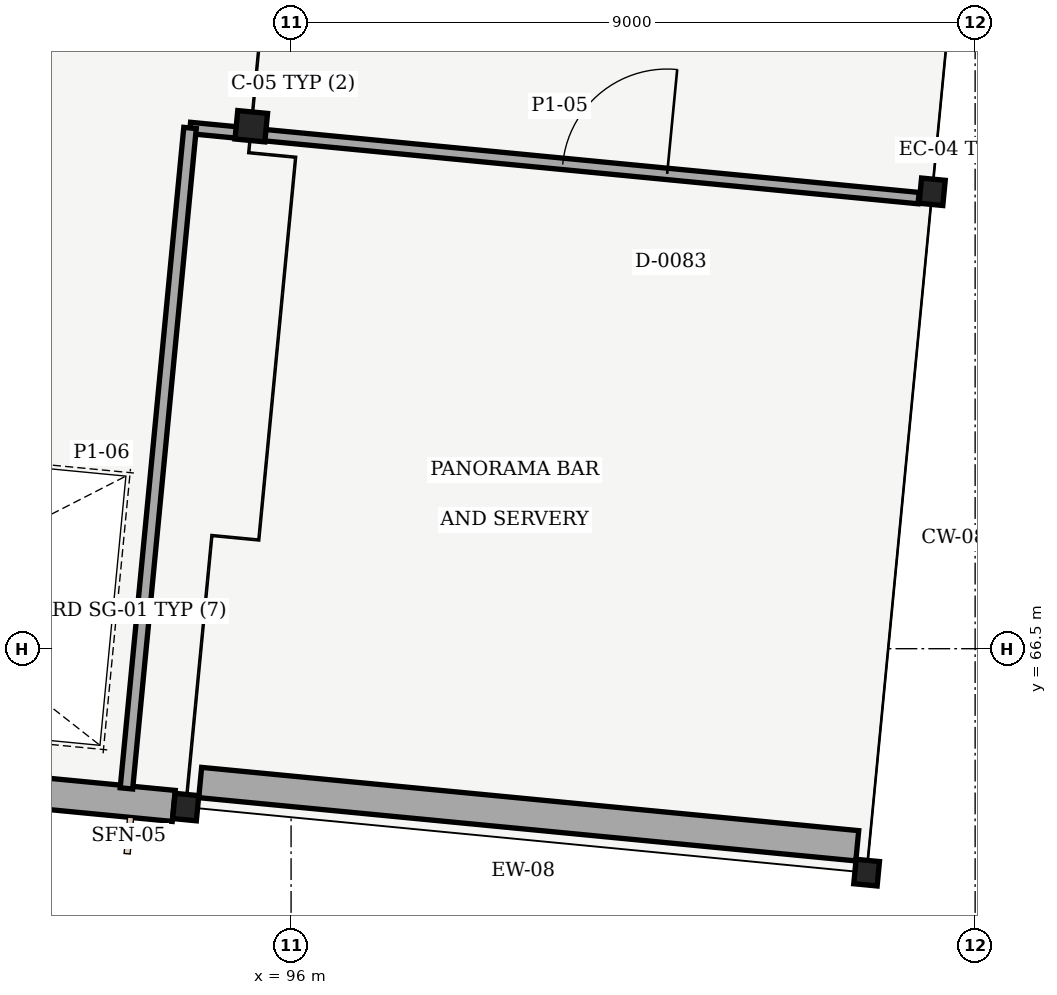
"""IFC4 building model, lengths in metres.
Left out: names, types, materials, properties, quantities, classifications, styles, units other than length and angle.
Written with IfcOpenShell. Run it as: python <this file> out.ifc"""

import sys

from ifc_helpers import new_model, si_unit, direction, frame, frame_2d, origin, origin_with_axes, origin_2d, place, context, subcontext, project, spatial, rectangle, i_section, extrude, element, fill, save


model = new_model("IFC4")
c1 = context("Model", 3, precision=1e-05, world=origin(), true_north=direction((0.0, 1.0)))
c2 = subcontext(c1, "Body", "Model", "MODEL_VIEW")
j1 = project(units=[si_unit("LENGTHUNIT", "METRE"), si_unit("PLANEANGLEUNIT", "RADIAN")], contexts=[c1])
p1 = place(None, origin())
s1 = spatial("IfcSite", under=j1, at=p1, CompositionType="ELEMENT")
p2 = place(p1, origin())
s2 = spatial("IfcBuilding", under=s1, at=p2, CompositionType="ELEMENT")
p3 = place(p2, frame((0.0, 0.0, 9.6)))
s3 = spatial("IfcBuildingStorey", under=s2, at=p3, CompositionType="ELEMENT", Elevation=9.6)
p4 = place(p3, frame((94.614, 64.416, 0.0), z_axis=(0.0, 0.0, 1.0), x_axis=(0.995396198367, -0.09584575252, 0.0)))
e1 = element("IfcColumn", 1, at=p4, inside=s3, PredefinedType="COLUMN", context=c2, shape_type="SweptSolid", body=[
    extrude(i_section(OverallWidth=0.313, OverallDepth=0.333, WebThickness=0.018, FlangeThickness=0.028, FilletRadius=0.013, at=origin_2d()), origin(), (0.0, 0.0, 1.0), 4.8),
])
p5 = place(p3, frame((95.476, 73.375, 0.0), z_axis=(0.0, 0.0, 1.0), x_axis=(0.995396198367, -0.09584575252, 0.0)))
e2 = element("IfcColumn", 2, at=p5, inside=s3, PredefinedType="COLUMN", context=c2, shape_type="SweptSolid", body=[
    extrude(i_section(OverallWidth=0.394, OverallDepth=0.376, WebThickness=0.017, FlangeThickness=0.028, FilletRadius=0.015, at=origin_2d()), origin(), (0.0, 0.0, 1.0), 4.8),
])
p6 = place(p3, frame((103.572, 63.553, 0.0), z_axis=(0.0, 0.0, 1.0), x_axis=(0.995396198367, -0.09584575252, 0.0)))
e3 = element("IfcColumn", 3, at=p6, inside=s3, PredefinedType="COLUMN", context=c2, shape_type="SweptSolid", body=[
    extrude(i_section(OverallWidth=0.309, OverallDepth=0.323, WebThickness=0.014, FlangeThickness=0.023, FilletRadius=0.013, at=origin_2d()), origin(), (0.0, 0.0, 1.0), 4.8),
])
p7 = place(p3, frame((104.435, 72.512, 0.0), z_axis=(0.0, 0.0, 1.0), x_axis=(0.995396198367, -0.09584575252, 0.0)))
e4 = element("IfcColumn", 4, at=p7, inside=s3, PredefinedType="COLUMN", context=c2, shape_type="SweptSolid", body=[
    extrude(i_section(OverallWidth=0.313, OverallDepth=0.333, WebThickness=0.018, FlangeThickness=0.028, FilletRadius=0.013, at=origin_2d()), origin(), (0.0, 0.0, 1.0), 4.8),
])
p8 = place(p3, frame((103.449, 63.907, 0.0), z_axis=(0.0, 0.0, 1.0), x_axis=(-0.995397794476, 0.095829174848, 0.0)))
e5 = element("IfcWall", 5, at=p8, inside=s3, PredefinedType="SOLIDWALL", context=c2, shape_type="SweptSolid", body=[
    extrude(rectangle(XDim=8.685, YDim=0.4, at=frame_2d((4.343, 0.0))), origin(), (0.0, 0.0, 1.0), 3.4),
])
p9 = place(p3, frame((94.456, 64.431, 0.0), z_axis=(0.0, 0.0, 1.0), x_axis=(-0.99539453955, 0.09586297843, 0.0)))
e6 = element("IfcWall", 6, at=p9, inside=s3, PredefinedType="SOLIDWALL", context=c2, shape_type="SweptSolid", body=[
    extrude(rectangle(XDim=8.712, YDim=0.41, at=frame_2d((4.356, 0.0))), origin(), (0.0, 0.0, 1.0), 3.4),
])
p10 = place(p3, frame((94.67, 73.352, 0.0), z_axis=(0.0, 0.0, 1.0), x_axis=(0.995395223339, -0.095855878039, 0.0)))
e7 = element("IfcWall", 7, at=p10, inside=s3, PredefinedType="PARTITIONING", context=c2, shape_type="SweptSolid", body=[
    extrude(rectangle(XDim=9.63, YDim=0.15, at=frame_2d((4.815, 0.0))), origin(), (0.0, 0.0, 1.0), 3.38),
])
p11 = place(p10, frame((4.927, 0.0, 0.0)))
e8 = element("IfcOpeningElement", 8, at=p11, cuts=e7, PredefinedType="OPENING", context=c2, shape_type="SweptSolid", body=[
    extrude(rectangle(XDim=1.38, YDim=2.22, at=frame_2d((0.69, 1.11))), frame((0.0, 0.085, 0.0), z_axis=(0.0, -1.0, 0.0), x_axis=(1.0, 0.0, 0.0)), (0.0, 0.0, 1.0), 0.17),
])
p12 = place(p3, frame((93.834, 64.662, 0.0), z_axis=(0.0, 0.0, 1.0), x_axis=(0.095837096923, 0.995397031768, 0.0)))
e9 = element("IfcWall", 9, at=p12, inside=s3, PredefinedType="PARTITIONING", context=c2, shape_type="SweptSolid", body=[
    extrude(rectangle(XDim=8.73, YDim=0.165, at=frame_2d((4.365, 0.0))), origin(), (0.0, 0.0, 1.0), 3.38),
])
p13 = place(p11, origin_with_axes())
e10 = element("IfcDoor", 10, at=p13, inside=s3, OperationType="SINGLE_SWING_RIGHT", PredefinedType="DOOR", context=c2, shape_type="SweptSolid", body=[
    extrude(rectangle(XDim=1.38, YDim=2.22, at=frame_2d((0.69, 1.11))), frame((0.0, 0.025, 0.0), z_axis=(0.0, -1.0, 0.0), x_axis=(1.0, 0.0, 0.0)), (0.0, 0.0, 1.0), 0.05),
])
fill(e8, e10)
save(model, sys.argv[1])
